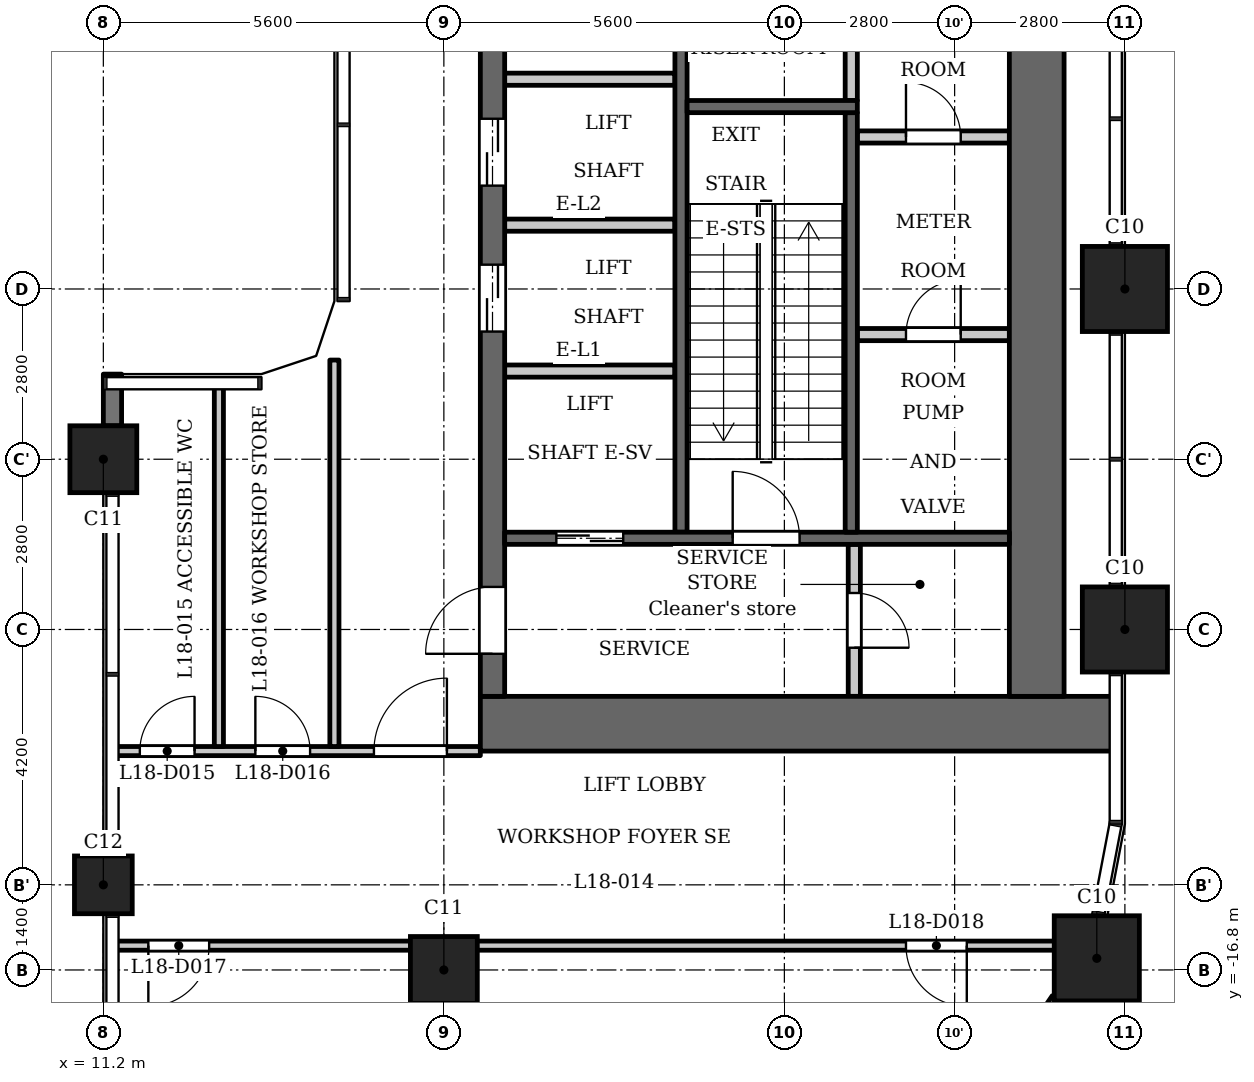
"""IFC4 building model, lengths in metres.
Left out: names, types, materials, properties, quantities, classifications, styles, units other than length and angle.
Written with IfcOpenShell. Run it as: python <this file> out.ifc"""

import sys

from ifc_helpers import new_model, si_unit, direction, frame, frame_2d, origin, origin_2d, place, context, subcontext, project, spatial, polyline, rectangle, outline, extrude, element, fill, save


model = new_model("IFC4")
c1 = context("Model", 3, precision=1e-05, world=origin(), true_north=direction((0.0, 1.0)))
c2 = subcontext(c1, "Body", "Model", "MODEL_VIEW")
j1 = project(units=[si_unit("LENGTHUNIT", "METRE"), si_unit("PLANEANGLEUNIT", "RADIAN")], contexts=[c1])
p1 = place(None, origin())
s1 = spatial("IfcSite", under=j1, at=p1, CompositionType="ELEMENT")
p2 = place(p1, origin())
s2 = spatial("IfcBuilding", under=s1, at=p2, CompositionType="ELEMENT")
p3 = place(p2, frame((0.0, 0.0, 72.5)))
s3 = spatial("IfcBuildingStorey", under=s2, at=p3, CompositionType="ELEMENT", Elevation=72.5)
for number, where, z_axis, x_axis in (
    (1, (27.538, -16.609, 0.0), (0.0, 0.0, 1.0), (1.0, 0.0, 0.0)),
    (2, (28.0, -11.2, 0.0), (0.0, 0.0, 1.0), (1.0, 0.0, 0.0)),
    (3, (28.0, -5.6, 0.0), (0.0, 0.0, 1.0), (1.0, 0.0, 0.0)),
):
    element("IfcColumn", number, at=place(p3, frame(where, z_axis=z_axis, x_axis=x_axis)), inside=s3, PredefinedType="COLUMN", context=c2, shape_type="SweptSolid", body=[
        extrude(rectangle(XDim=1.4, YDim=1.4, at=origin_2d()), origin(), (0.0, 0.0, 1.0), 5.4),
    ])
for number, where, z_axis, x_axis in (
    (4, (16.8, -16.8, 0.0), (0.0, 0.0, 1.0), (1.0, 0.0, 0.0)),
    (5, (11.2, -8.4, 0.0), (0.0, 0.0, 1.0), (1.0, 0.0, 0.0)),
):
    element("IfcColumn", number, at=place(p3, frame(where, z_axis=z_axis, x_axis=x_axis)), inside=s3, PredefinedType="COLUMN", context=c2, shape_type="SweptSolid", body=[
        extrude(rectangle(XDim=1.1, YDim=1.1, at=origin_2d()), origin(), (0.0, 0.0, 1.0), 5.4),
    ])
p4 = place(p3, frame((11.2, -15.4, 0.0), z_axis=(0.0, 0.0, 1.0), x_axis=(1.0, 0.0, 0.0)))
e6 = element("IfcColumn", 6, at=p4, inside=s3, PredefinedType="COLUMN", context=c2, shape_type="SweptSolid", body=[
    extrude(rectangle(XDim=0.95, YDim=0.95, at=origin_2d()), origin(), (0.0, 0.0, 1.0), 5.4),
])
p5 = place(p3, frame((11.35, -7.0, 0.0), z_axis=(0.0, 0.0, 1.0), x_axis=(0.0, -1.0, 0.0)))
e7 = element("IfcWall", 7, at=p5, inside=s3, PredefinedType="SOLIDWALL", context=c2, shape_type="SweptSolid", body=[
    extrude(rectangle(XDim=0.85, YDim=0.3, at=frame_2d((0.425, 0.0))), origin(), (0.0, 0.0, 1.0), 4.95),
])
p6 = place(p3, frame((26.636, -17.74, 0.0), z_axis=(0.0, 0.0, 1.0), x_axis=(0.561913238827, 0.827196175059, 0.0)))
e8 = element("IfcWall", 8, at=p6, inside=s3, PredefinedType="SOLIDWALL", context=c2, shape_type="SweptSolid", body=[
    extrude(rectangle(XDim=0.522, YDim=0.3, at=frame_2d((0.261, 0.0))), origin(), (0.0, 0.0, 1.0), 4.95),
])
p7 = place(p3, frame((23.5, -2.5, 0.0), z_axis=(0.0, 0.0, 1.0), x_axis=(0.0, 1.0, 0.0)))
e9 = element("IfcWall", 9, at=p7, inside=s3, PredefinedType="PARTITIONING", context=c2, shape_type="SweptSolid", body=[
    extrude(rectangle(XDim=2.65, YDim=0.2, at=frame_2d((1.325, 0.0))), origin(), (0.0, 0.0, 1.0), 4.95),
])
p8 = place(p3, frame((20.7, -9.6, 0.0), z_axis=(0.0, 0.0, 1.0), x_axis=(0.0, 1.0, 0.0)))
e10 = element("IfcWall", 10, at=p8, inside=s3, PredefinedType="SHEAR", context=c2, shape_type="SweptSolid", body=[
    extrude(rectangle(XDim=9.75, YDim=0.2, at=frame_2d((4.875, 0.0))), origin(), (0.0, 0.0, 1.0), 4.95),
])
p9 = place(p3, frame((17.4, -12.75, 0.0), z_axis=(0.0, 0.0, 1.0), x_axis=(1.0, 0.0, 0.0)))
e11 = element("IfcWall", 11, at=p9, inside=s3, PredefinedType="SHEAR", context=c2, shape_type="SweptSolid", body=[
    extrude(rectangle(XDim=10.4, YDim=0.9, at=frame_2d((5.2, 0.0))), origin(), (0.0, 0.0, 1.0), 4.95),
])
p10 = place(p3, frame((17.6, -12.3, 0.0), z_axis=(0.0, 0.0, 1.0), x_axis=(0.0, 1.0, 0.0)))
e12 = element("IfcWall", 12, at=p10, inside=s3, PredefinedType="SHEAR", context=c2, shape_type="SweptSolid", body=[
    extrude(rectangle(XDim=24.6, YDim=0.4, at=frame_2d((12.3, 0.0))), origin(), (0.0, 0.0, 1.0), 4.95),
])
p11 = place(p10, frame((6.0, 0.0, 0.0)))
e13 = element("IfcOpeningElement", 13, at=p11, cuts=e12, PredefinedType="OPENING", context=c2, shape_type="SweptSolid", body=[
    extrude(rectangle(XDim=1.1, YDim=2.1, at=frame_2d((0.55, 1.05))), frame((0.0, 0.21, 0.0), z_axis=(0.0, -1.0, 0.0), x_axis=(1.0, 0.0, 0.0)), (0.0, 0.0, 1.0), 0.42),
])
p12 = place(p10, frame((8.4, 0.0, 0.0)))
e14 = element("IfcOpeningElement", 14, at=p12, cuts=e12, PredefinedType="OPENING", context=c2, shape_type="SweptSolid", body=[
    extrude(rectangle(XDim=1.1, YDim=2.1, at=frame_2d((0.55, 1.05))), frame((0.0, 0.21, 0.0), z_axis=(0.0, -1.0, 0.0), x_axis=(1.0, 0.0, 0.0)), (0.0, 0.0, 1.0), 0.42),
])
p13 = place(p10, frame((10.8, 0.0, 0.0)))
e15 = element("IfcOpeningElement", 15, at=p13, cuts=e12, PredefinedType="OPENING", context=c2, shape_type="SweptSolid", body=[
    extrude(rectangle(XDim=1.1, YDim=2.1, at=frame_2d((0.55, 1.05))), frame((0.0, 0.21, 0.0), z_axis=(0.0, -1.0, 0.0), x_axis=(1.0, 0.0, 0.0)), (0.0, 0.0, 1.0), 0.42),
])
p14 = place(p10, frame((16.75, 0.0, 0.0)))
e16 = element("IfcOpeningElement", 16, at=p14, cuts=e12, PredefinedType="OPENING", context=c2, shape_type="SweptSolid", body=[
    extrude(rectangle(XDim=0.9, YDim=2.1, at=frame_2d((0.45, 1.05))), frame((0.0, 0.21, 0.0), z_axis=(0.0, -1.0, 0.0), x_axis=(1.0, 0.0, 0.0)), (0.0, 0.0, 1.0), 0.42),
])
p15 = place(p10, frame((22.8, 0.0, 0.0)))
e17 = element("IfcOpeningElement", 17, at=p15, cuts=e12, PredefinedType="OPENING", context=c2, shape_type="SweptSolid", body=[
    extrude(rectangle(XDim=1.1, YDim=2.1, at=frame_2d((0.55, 1.05))), frame((0.0, 0.21, 0.0), z_axis=(0.0, -1.0, 0.0), x_axis=(1.0, 0.0, 0.0)), (0.0, 0.0, 1.0), 0.42),
])
p16 = place(p10, frame((0.7, 0.0, 0.0)))
e18 = element("IfcOpeningElement", 18, at=p16, cuts=e12, PredefinedType="OPENING", context=c2, shape_type="SweptSolid", body=[
    extrude(rectangle(XDim=1.1, YDim=2.1, at=frame_2d((0.55, 1.05))), frame((0.0, 0.21, 0.0), z_axis=(0.0, -1.0, 0.0), x_axis=(1.0, 0.0, 0.0)), (0.0, 0.0, 1.0), 0.42),
])
p17 = place(p10, frame((12.775, 0.0, 0.0)))
e19 = element("IfcOpeningElement", 19, at=p17, cuts=e12, PredefinedType="OPENING", context=c2, shape_type="SweptSolid", body=[
    extrude(rectangle(XDim=1.8, YDim=2.1, at=frame_2d((0.9, 1.05))), frame((0.0, 0.21, 0.0), z_axis=(0.0, -1.0, 0.0), x_axis=(1.0, 0.0, 0.0)), (0.0, 0.0, 1.0), 0.42),
])
p18 = place(p3, frame((26.55, -12.3, 0.0), z_axis=(0.0, 0.0, 1.0), x_axis=(0.0, 1.0, 0.0)))
e20 = element("IfcWall", 20, at=p18, inside=s3, PredefinedType="SHEAR", context=c2, shape_type="SweptSolid", body=[
    extrude(rectangle(XDim=24.6, YDim=0.9, at=frame_2d((12.3, 0.0))), origin(), (0.0, 0.0, 1.0), 4.95),
])
p19 = place(p3, frame((23.55, -12.3, 0.0), z_axis=(0.0, 0.0, 1.0), x_axis=(0.0, 1.0, 0.0)))
e21 = element("IfcWall", 21, at=p19, inside=s3, PredefinedType="PARTITIONING", context=c2, shape_type="SweptSolid", body=[
    extrude(rectangle(XDim=2.5, YDim=0.2, at=frame_2d((1.25, 0.0))), origin(), (0.0, 0.0, 1.0), 4.95),
])
p20 = place(p19, frame((0.8, 0.0, 0.0)))
e22 = element("IfcOpeningElement", 22, at=p20, cuts=e21, PredefinedType="OPENING", context=c2, shape_type="SweptSolid", body=[
    extrude(rectangle(XDim=0.9, YDim=2.1, at=frame_2d((0.45, 1.05))), frame((0.0, 0.11, 0.0), z_axis=(0.0, -1.0, 0.0), x_axis=(1.0, 0.0, 0.0)), (0.0, 0.0, 1.0), 0.22),
])
p21 = place(p3, frame((23.6, -6.35, 0.0), z_axis=(0.0, 0.0, 1.0), x_axis=(1.0, 0.0, 0.0)))
e23 = element("IfcWall", 23, at=p21, inside=s3, PredefinedType="PARTITIONING", context=c2, shape_type="SweptSolid", body=[
    extrude(rectangle(XDim=2.5, YDim=0.2, at=frame_2d((1.25, 0.0))), origin(), (0.0, 0.0, 1.0), 4.95),
])
p22 = place(p21, frame((0.8, 0.0, 0.0)))
e24 = element("IfcOpeningElement", 24, at=p22, cuts=e23, PredefinedType="OPENING", context=c2, shape_type="SweptSolid", body=[
    extrude(rectangle(XDim=0.9, YDim=2.1, at=frame_2d((0.45, 1.05))), frame((0.0, 0.11, 0.0), z_axis=(0.0, -1.0, 0.0), x_axis=(1.0, 0.0, 0.0)), (0.0, 0.0, 1.0), 0.22),
])
p23 = place(p3, frame((23.6, -3.1, 0.0), z_axis=(0.0, 0.0, 1.0), x_axis=(1.0, 0.0, 0.0)))
e25 = element("IfcWall", 25, at=p23, inside=s3, PredefinedType="PARTITIONING", context=c2, shape_type="SweptSolid", body=[
    extrude(rectangle(XDim=2.5, YDim=0.2, at=frame_2d((1.25, 0.0))), origin(), (0.0, 0.0, 1.0), 4.95),
])
p24 = place(p23, frame((0.8, 0.0, 0.0)))
e26 = element("IfcOpeningElement", 26, at=p24, cuts=e25, PredefinedType="OPENING", context=c2, shape_type="SweptSolid", body=[
    extrude(rectangle(XDim=0.9, YDim=2.1, at=frame_2d((0.45, 1.05))), frame((0.0, 0.11, 0.0), z_axis=(0.0, -1.0, 0.0), x_axis=(1.0, 0.0, 0.0)), (0.0, 0.0, 1.0), 0.22),
])
p25 = place(p3, frame((17.8, -9.7, 0.0), z_axis=(0.0, 0.0, 1.0), x_axis=(1.0, 0.0, 0.0)))
e27 = element("IfcWall", 27, at=p25, inside=s3, PredefinedType="SHEAR", context=c2, shape_type="SweptSolid", body=[
    extrude(rectangle(XDim=8.3, YDim=0.2, at=frame_2d((4.15, 0.0))), origin(), (0.0, 0.0, 1.0), 4.95),
])
p26 = place(p25, frame((0.85, 0.0, 0.0)))
e28 = element("IfcOpeningElement", 28, at=p26, cuts=e27, PredefinedType="OPENING", context=c2, shape_type="SweptSolid", body=[
    extrude(rectangle(XDim=1.1, YDim=2.1, at=frame_2d((0.55, 1.05))), frame((0.0, 0.11, 0.0), z_axis=(0.0, -1.0, 0.0), x_axis=(1.0, 0.0, 0.0)), (0.0, 0.0, 1.0), 0.22),
])
p27 = place(p25, frame((3.75, 0.0, 0.0)))
e29 = element("IfcOpeningElement", 29, at=p27, cuts=e27, PredefinedType="OPENING", context=c2, shape_type="SweptSolid", body=[
    extrude(rectangle(XDim=1.1, YDim=2.1, at=frame_2d((0.55, 1.05))), frame((0.0, 0.11, 0.0), z_axis=(0.0, -1.0, 0.0), x_axis=(1.0, 0.0, 0.0)), (0.0, 0.0, 1.0), 0.22),
])
for number, where, z_axis, x_axis in (
    (30, (17.8, -6.95, 0.0), (0.0, 0.0, 1.0), (1.0, 0.0, 0.0)),
    (31, (17.8, -4.55, 0.0), (0.0, 0.0, 1.0), (1.0, 0.0, 0.0)),
    (32, (17.8, -2.15, 0.0), (0.0, 0.0, 1.0), (1.0, 0.0, 0.0)),
):
    element("IfcWall", number, at=place(p3, frame(where, z_axis=z_axis, x_axis=x_axis)), inside=s3, PredefinedType="PARTITIONING", context=c2, shape_type="SweptSolid", body=[
        extrude(rectangle(XDim=2.8, YDim=0.2, at=frame_2d((1.4, 0.0))), origin(), (0.0, 0.0, 1.0), 4.95),
    ])
p28 = place(p3, frame((23.5, -9.6, 0.0), z_axis=(0.0, 0.0, 1.0), x_axis=(0.0, 1.0, 0.0)))
e33 = element("IfcWall", 33, at=p28, inside=s3, PredefinedType="SHEAR", context=c2, shape_type="SweptSolid", body=[
    extrude(rectangle(XDim=6.9, YDim=0.2, at=frame_2d((3.45, 0.0))), origin(), (0.0, 0.0, 1.0), 4.95),
])
p29 = place(p3, frame((20.8, -2.6, 0.0), z_axis=(0.0, 0.0, 1.0), x_axis=(1.0, 0.0, 0.0)))
e34 = element("IfcWall", 34, at=p29, inside=s3, PredefinedType="SHEAR", context=c2, shape_type="SweptSolid", body=[
    extrude(rectangle(XDim=2.8, YDim=0.2, at=frame_2d((1.4, 0.0))), origin(), (0.0, 0.0, 1.0), 4.95),
])
p30 = place(p3, frame((11.384, -16.4, 0.0), z_axis=(0.0, 0.0, 1.0), x_axis=(1.0, 0.0, 0.0)))
e35 = element("IfcWall", 35, at=p30, inside=s3, PredefinedType="PARTITIONING", context=c2, shape_type="SweptSolid", body=[
    extrude(rectangle(XDim=16.136, YDim=0.15, at=frame_2d((8.068, 0.0))), origin(), (0.0, 0.0, 1.0), 4.95),
])
p31 = place(p30, frame((0.556, 0.0, 0.0)))
e36 = element("IfcOpeningElement", 36, at=p31, cuts=e35, PredefinedType="OPENING", context=c2, shape_type="SweptSolid", body=[
    extrude(rectangle(XDim=1.0, YDim=2.1, at=frame_2d((0.5, 1.05))), frame((0.0, 0.085, 0.0), z_axis=(0.0, -1.0, 0.0), x_axis=(1.0, 0.0, 0.0)), (0.0, 0.0, 1.0), 0.17),
])
p32 = place(p30, frame((13.016, 0.0, 0.0)))
e37 = element("IfcOpeningElement", 37, at=p32, cuts=e35, PredefinedType="OPENING", context=c2, shape_type="SweptSolid", body=[
    extrude(rectangle(XDim=1.0, YDim=2.1, at=frame_2d((0.5, 1.05))), frame((0.0, 0.085, 0.0), z_axis=(0.0, -1.0, 0.0), x_axis=(1.0, 0.0, 0.0)), (0.0, 0.0, 1.0), 0.17),
])
p33 = place(p3, frame((11.384, -13.2, 0.0), z_axis=(0.0, 0.0, 1.0), x_axis=(1.0, 0.0, 0.0)))
e38 = element("IfcWall", 38, at=p33, inside=s3, PredefinedType="PARTITIONING", context=c2, shape_type="SweptSolid", body=[
    extrude(rectangle(XDim=6.016, YDim=0.15, at=frame_2d((3.008, 0.0))), origin(), (0.0, 0.0, 1.0), 4.95),
])
p34 = place(p33, frame((4.266, 0.0, 0.0)))
e39 = element("IfcOpeningElement", 39, at=p34, cuts=e38, PredefinedType="OPENING", context=c2, shape_type="SweptSolid", body=[
    extrude(rectangle(XDim=1.2, YDim=2.1, at=frame_2d((0.6, 1.05))), frame((0.0, 0.085, 0.0), z_axis=(0.0, -1.0, 0.0), x_axis=(1.0, 0.0, 0.0)), (0.0, 0.0, 1.0), 0.17),
])
p35 = place(p33, frame((0.416, 0.0, 0.0)))
e40 = element("IfcOpeningElement", 40, at=p35, cuts=e38, PredefinedType="OPENING", context=c2, shape_type="SweptSolid", body=[
    extrude(rectangle(XDim=0.9, YDim=2.1, at=frame_2d((0.45, 1.05))), frame((0.0, 0.085, 0.0), z_axis=(0.0, -1.0, 0.0), x_axis=(1.0, 0.0, 0.0)), (0.0, 0.0, 1.0), 0.17),
])
p36 = place(p33, frame((2.316, 0.0, 0.0)))
e41 = element("IfcOpeningElement", 41, at=p36, cuts=e38, PredefinedType="OPENING", context=c2, shape_type="SweptSolid", body=[
    extrude(rectangle(XDim=0.9, YDim=2.1, at=frame_2d((0.45, 1.05))), frame((0.0, 0.085, 0.0), z_axis=(0.0, -1.0, 0.0), x_axis=(1.0, 0.0, 0.0)), (0.0, 0.0, 1.0), 0.17),
])
p37 = place(p3, frame((13.1, -13.125, 0.0), z_axis=(0.0, 0.0, 1.0), x_axis=(0.0, 1.0, 0.0)))
e42 = element("IfcWall", 42, at=p37, inside=s3, PredefinedType="PARTITIONING", context=c2, shape_type="SweptSolid", body=[
    extrude(rectangle(XDim=5.941, YDim=0.15, at=frame_2d((2.97, 0.0))), origin(), (0.0, 0.0, 1.0), 4.95),
])
p38 = place(p3, frame((15.0, -13.125, 0.0), z_axis=(0.0, 0.0, 1.0), x_axis=(0.0, 1.0, 0.0)))
e43 = element("IfcWall", 43, at=p38, inside=s3, PredefinedType="PARTITIONING", context=c2, shape_type="SweptSolid", body=[
    extrude(rectangle(XDim=6.356, YDim=0.15, at=frame_2d((3.178, 0.0))), origin(), (0.0, 0.0, 1.0), 4.95),
])
p39 = place(p3, frame((17.0, -23.08, 0.0), z_axis=(0.0, 0.0, 1.0), x_axis=(0.0, 1.0, 0.0)))
e44 = element("IfcWall", 44, at=p39, inside=s3, PredefinedType="PARTITIONING", context=c2, shape_type="SweptSolid", body=[
    extrude(rectangle(XDim=6.605, YDim=0.1, at=frame_2d((3.302, 0.0))), origin(), (0.0, 0.0, 1.0), 4.95),
])
p40 = place(p3, origin())
e45 = element("IfcWall", 45, at=p40, inside=s3, PredefinedType="SOLIDWALL", context=c2, shape_type="SweptSolid", body=[
    extrude(outline(polyline([(15.0, -5.8), (14.7, -6.7), (13.8, -7.0), (13.8, -7.3), (13.849, -7.3), (14.937, -6.937), (15.3, -5.849), (15.3, -5.8), (15.0, -5.8)])), origin(), (0.0, 0.0, 1.0), 4.95),
])
p41 = place(p26, origin())
e46 = element("IfcDoor", 46, at=p41, inside=s3, OperationType="DOUBLE_DOOR_SLIDING", PredefinedType="DOOR", context=c2, shape_type="SweptSolid", body=[
    extrude(rectangle(XDim=1.1, YDim=2.1, at=frame_2d((0.55, 1.05))), frame((0.0, 0.025, 0.0), z_axis=(0.0, -1.0, 0.0), x_axis=(1.0, 0.0, 0.0)), (0.0, 0.0, 1.0), 0.05),
])
fill(e28, e46)
p42 = place(p11, origin())
e47 = element("IfcDoor", 47, at=p42, inside=s3, OperationType="DOUBLE_DOOR_SLIDING", PredefinedType="DOOR", context=c2, shape_type="SweptSolid", body=[
    extrude(rectangle(XDim=1.1, YDim=2.1, at=frame_2d((0.55, 1.05))), frame((0.0, 0.025, 0.0), z_axis=(0.0, -1.0, 0.0), x_axis=(1.0, 0.0, 0.0)), (0.0, 0.0, 1.0), 0.05),
])
fill(e13, e47)
p43 = place(p12, origin())
e48 = element("IfcDoor", 48, at=p43, inside=s3, OperationType="DOUBLE_DOOR_SLIDING", PredefinedType="DOOR", context=c2, shape_type="SweptSolid", body=[
    extrude(rectangle(XDim=1.1, YDim=2.1, at=frame_2d((0.55, 1.05))), frame((0.0, 0.025, 0.0), z_axis=(0.0, -1.0, 0.0), x_axis=(1.0, 0.0, 0.0)), (0.0, 0.0, 1.0), 0.05),
])
fill(e14, e48)
p44 = place(p16, origin())
e49 = element("IfcDoor", 49, at=p44, inside=s3, OperationType="SINGLE_SWING_RIGHT", PredefinedType="DOOR", context=c2, shape_type="SweptSolid", body=[
    extrude(rectangle(XDim=1.1, YDim=2.1, at=frame_2d((0.55, 1.05))), frame((0.0, 0.025, 0.0), z_axis=(0.0, -1.0, 0.0), x_axis=(1.0, 0.0, 0.0)), (0.0, 0.0, 1.0), 0.05),
])
fill(e18, e49)
p45 = place(p20, origin())
e50 = element("IfcDoor", 50, at=p45, inside=s3, OperationType="SINGLE_SWING_LEFT", PredefinedType="DOOR", context=c2, shape_type="SweptSolid", body=[
    extrude(rectangle(XDim=0.9, YDim=2.1, at=frame_2d((0.45, 1.05))), frame((0.0, 0.025, 0.0), z_axis=(0.0, -1.0, 0.0), x_axis=(1.0, 0.0, 0.0)), (0.0, 0.0, 1.0), 0.05),
])
fill(e22, e50)
p46 = place(p27, origin())
e51 = element("IfcDoor", 51, at=p46, inside=s3, OperationType="SINGLE_SWING_RIGHT", PredefinedType="DOOR", context=c2, shape_type="SweptSolid", body=[
    extrude(rectangle(XDim=1.1, YDim=2.1, at=frame_2d((0.55, 1.05))), frame((0.0, 0.025, 0.0), z_axis=(0.0, -1.0, 0.0), x_axis=(1.0, 0.0, 0.0)), (0.0, 0.0, 1.0), 0.05),
])
fill(e29, e51)
p47 = place(p22, origin())
e52 = element("IfcDoor", 52, at=p47, inside=s3, OperationType="SINGLE_SWING_LEFT", PredefinedType="DOOR", context=c2, shape_type="SweptSolid", body=[
    extrude(rectangle(XDim=0.9, YDim=2.1, at=frame_2d((0.45, 1.05))), frame((0.0, 0.025, 0.0), z_axis=(0.0, -1.0, 0.0), x_axis=(1.0, 0.0, 0.0)), (0.0, 0.0, 1.0), 0.05),
])
fill(e24, e52)
p48 = place(p24, origin())
e53 = element("IfcDoor", 53, at=p48, inside=s3, OperationType="SINGLE_SWING_RIGHT", PredefinedType="DOOR", context=c2, shape_type="SweptSolid", body=[
    extrude(rectangle(XDim=0.9, YDim=2.1, at=frame_2d((0.45, 1.05))), frame((0.0, 0.025, 0.0), z_axis=(0.0, -1.0, 0.0), x_axis=(1.0, 0.0, 0.0)), (0.0, 0.0, 1.0), 0.05),
])
fill(e26, e53)
p49 = place(p34, origin())
e54 = element("IfcDoor", 54, at=p49, inside=s3, OperationType="SINGLE_SWING_LEFT", PredefinedType="DOOR", context=c2, shape_type="SweptSolid", body=[
    extrude(rectangle(XDim=1.2, YDim=2.1, at=frame_2d((0.6, 1.05))), frame((0.0, 0.025, 0.0), z_axis=(0.0, -1.0, 0.0), x_axis=(1.0, 0.0, 0.0)), (0.0, 0.0, 1.0), 0.05),
])
fill(e39, e54)
p50 = place(p35, origin())
e55 = element("IfcDoor", 55, at=p50, inside=s3, OperationType="SINGLE_SWING_LEFT", PredefinedType="DOOR", context=c2, shape_type="SweptSolid", body=[
    extrude(rectangle(XDim=0.9, YDim=2.1, at=frame_2d((0.45, 1.05))), frame((0.0, 0.025, 0.0), z_axis=(0.0, -1.0, 0.0), x_axis=(1.0, 0.0, 0.0)), (0.0, 0.0, 1.0), 0.05),
])
fill(e40, e55)
p51 = place(p36, origin())
e56 = element("IfcDoor", 56, at=p51, inside=s3, OperationType="SINGLE_SWING_RIGHT", PredefinedType="DOOR", context=c2, shape_type="SweptSolid", body=[
    extrude(rectangle(XDim=0.9, YDim=2.1, at=frame_2d((0.45, 1.05))), frame((0.0, 0.025, 0.0), z_axis=(0.0, -1.0, 0.0), x_axis=(1.0, 0.0, 0.0)), (0.0, 0.0, 1.0), 0.05),
])
fill(e41, e56)
p52 = place(p31, origin())
e57 = element("IfcDoor", 57, at=p52, inside=s3, OperationType="SINGLE_SWING_LEFT", PredefinedType="DOOR", context=c2, shape_type="SweptSolid", body=[
    extrude(rectangle(XDim=1.0, YDim=2.1, at=frame_2d((0.5, 1.05))), frame((0.0, 0.025, 0.0), z_axis=(0.0, -1.0, 0.0), x_axis=(1.0, 0.0, 0.0)), (0.0, 0.0, 1.0), 0.05),
])
fill(e36, e57)
p53 = place(p32, origin())
e58 = element("IfcDoor", 58, at=p53, inside=s3, OperationType="SINGLE_SWING_RIGHT", PredefinedType="DOOR", context=c2, shape_type="SweptSolid", body=[
    extrude(rectangle(XDim=1.0, YDim=2.1, at=frame_2d((0.5, 1.05))), frame((0.0, 0.025, 0.0), z_axis=(0.0, -1.0, 0.0), x_axis=(1.0, 0.0, 0.0)), (0.0, 0.0, 1.0), 0.05),
])
fill(e37, e58)
save(model, sys.argv[1])
